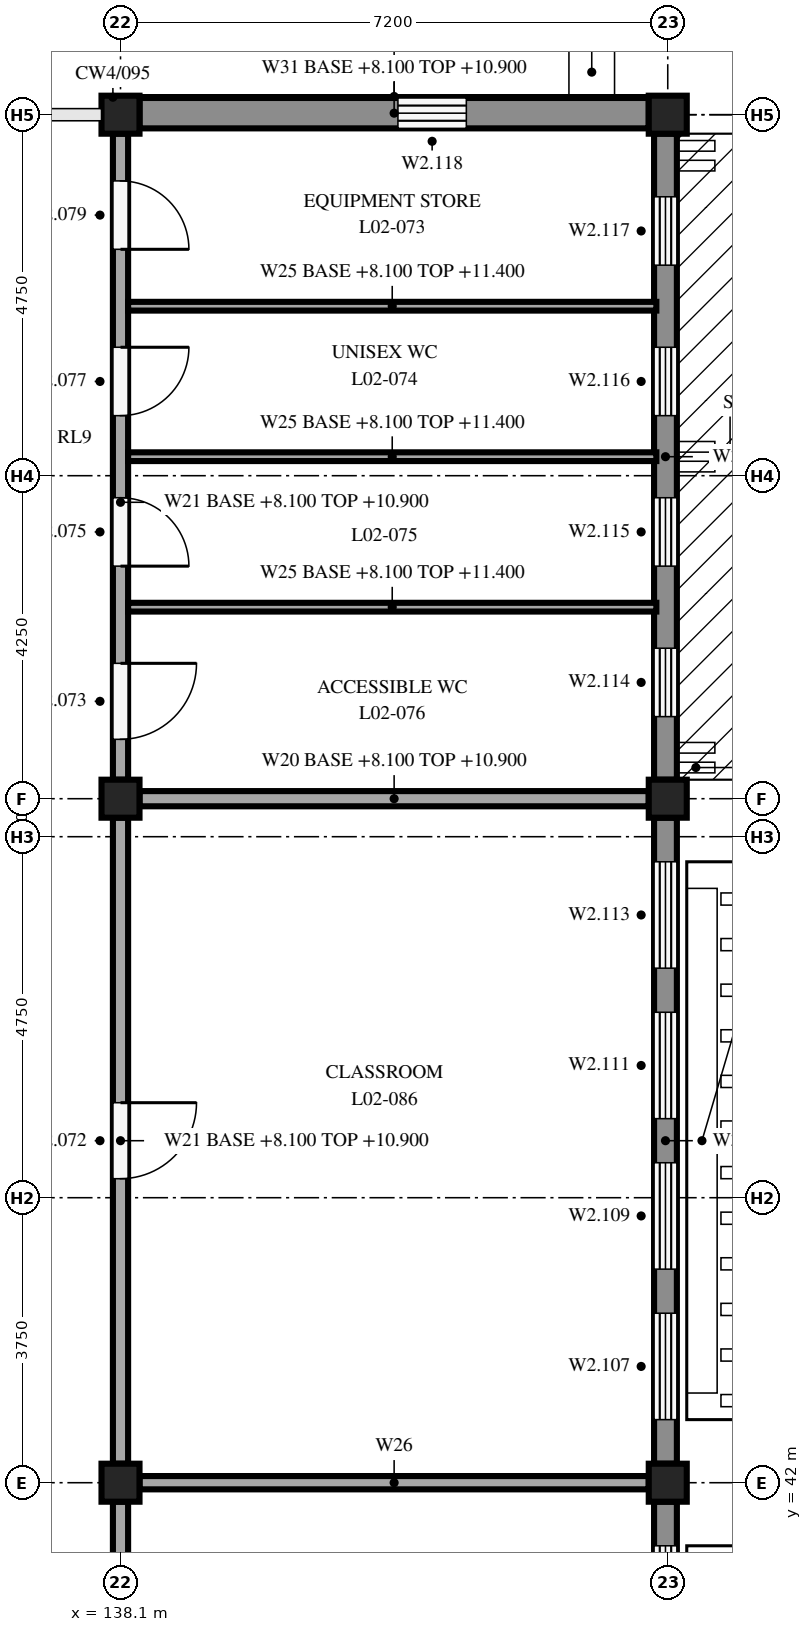
"""IFC4 building model, lengths in metres.
Left out: names, types, materials, properties, quantities, classifications, styles, units other than length and angle.
Written with IfcOpenShell. Run it as: python <this file> out.ifc"""

import sys

from ifc_helpers import new_model, si_unit, direction, frame, frame_2d, origin, origin_2d, place, context, subcontext, project, spatial, rectangle, extrude, element, fill, save


model = new_model("IFC4")
c1 = context("Model", 3, precision=1e-05, world=origin(), true_north=direction((0.0, 1.0)))
c2 = subcontext(c1, "Body", "Model", "MODEL_VIEW")
j1 = project(units=[si_unit("LENGTHUNIT", "METRE"), si_unit("PLANEANGLEUNIT", "RADIAN")], contexts=[c1])
p1 = place(None, origin())
s1 = spatial("IfcSite", under=j1, at=p1, CompositionType="ELEMENT")
p2 = place(p1, origin())
s2 = spatial("IfcBuilding", under=s1, at=p2, CompositionType="ELEMENT")
p3 = place(p2, frame((0.0, 0.0, 8.1)))
s3 = spatial("IfcBuildingStorey", under=s2, at=p3, CompositionType="ELEMENT", Elevation=8.1)
for number, where, z_axis, x_axis in (
    (1, (138.1, 42.0, 0.0), (0.0, 0.0, 1.0), (1.0, 0.0, 0.0)),
    (2, (138.1, 51.0, 0.0), (0.0, 0.0, 1.0), (1.0, 0.0, 0.0)),
    (3, (138.1, 60.0, 0.0), (0.0, 0.0, 1.0), (1.0, 0.0, 0.0)),
    (4, (145.3, 42.0, 0.0), (0.0, 0.0, 1.0), (1.0, 0.0, 0.0)),
    (5, (145.3, 51.0, 0.0), (0.0, 0.0, 1.0), (1.0, 0.0, 0.0)),
    (6, (145.3, 60.0, 0.0), (0.0, 0.0, 1.0), (1.0, 0.0, 0.0)),
):
    element("IfcColumn", number, at=place(p3, frame(where, z_axis=z_axis, x_axis=x_axis)), inside=s3, PredefinedType="COLUMN", context=c2, shape_type="SweptSolid", body=[
        extrude(rectangle(XDim=0.5, YDim=0.5, at=origin_2d()), origin(), (0.0, 0.0, 1.0), 3.3),
    ])
p4 = place(p3, frame((145.27, 41.75, 0.0), z_axis=(0.0, 0.0, 1.0), x_axis=(0.0, -1.0, 0.0)))
e7 = element("IfcWall", 7, at=p4, inside=s3, PredefinedType="STANDARD", context=c2, shape_type="SweptSolid", body=[
    extrude(rectangle(XDim=8.5, YDim=0.3, at=frame_2d((4.25, 0.0))), origin(), (0.0, 0.0, 1.0), 2.75),
])
p5 = place(p4, frame((6.52, 0.0, 0.6)))
e8 = element("IfcOpeningElement", 8, at=p5, cuts=e7, PredefinedType="OPENING", context=c2, shape_type="SweptSolid", body=[
    extrude(rectangle(XDim=1.4, YDim=2.1, at=frame_2d((0.7, 1.05))), frame((0.0, 0.16, 0.0), z_axis=(0.0, -1.0, 0.0), x_axis=(1.0, 0.0, 0.0)), (0.0, 0.0, 1.0), 0.32),
])
p6 = place(p4, frame((4.54, 0.0, 0.6)))
e9 = element("IfcOpeningElement", 9, at=p6, cuts=e7, PredefinedType="OPENING", context=c2, shape_type="SweptSolid", body=[
    extrude(rectangle(XDim=1.4, YDim=2.1, at=frame_2d((0.7, 1.05))), frame((0.0, 0.16, 0.0), z_axis=(0.0, -1.0, 0.0), x_axis=(1.0, 0.0, 0.0)), (0.0, 0.0, 1.0), 0.32),
])
p7 = place(p4, frame((2.56, 0.0, 0.6)))
e10 = element("IfcOpeningElement", 10, at=p7, cuts=e7, PredefinedType="OPENING", context=c2, shape_type="SweptSolid", body=[
    extrude(rectangle(XDim=1.4, YDim=2.1, at=frame_2d((0.7, 1.05))), frame((0.0, 0.16, 0.0), z_axis=(0.0, -1.0, 0.0), x_axis=(1.0, 0.0, 0.0)), (0.0, 0.0, 1.0), 0.32),
])
p8 = place(p4, frame((0.58, 0.0, 0.6)))
e11 = element("IfcOpeningElement", 11, at=p8, cuts=e7, PredefinedType="OPENING", context=c2, shape_type="SweptSolid", body=[
    extrude(rectangle(XDim=1.4, YDim=2.1, at=frame_2d((0.7, 1.05))), frame((0.0, 0.16, 0.0), z_axis=(0.0, -1.0, 0.0), x_axis=(1.0, 0.0, 0.0)), (0.0, 0.0, 1.0), 0.32),
])
p9 = place(p3, frame((145.27, 50.75, 0.0), z_axis=(0.0, 0.0, 1.0), x_axis=(0.0, -1.0, 0.0)))
e12 = element("IfcWall", 12, at=p9, inside=s3, PredefinedType="STANDARD", context=c2, shape_type="SweptSolid", body=[
    extrude(rectangle(XDim=8.5, YDim=0.3, at=frame_2d((4.25, 0.0))), origin(), (0.0, 0.0, 1.0), 2.75),
])
p10 = place(p9, frame((6.52, 0.0, 0.6)))
e13 = element("IfcOpeningElement", 13, at=p10, cuts=e12, PredefinedType="OPENING", context=c2, shape_type="SweptSolid", body=[
    extrude(rectangle(XDim=1.4, YDim=2.1, at=frame_2d((0.7, 1.05))), frame((0.0, 0.16, 0.0), z_axis=(0.0, -1.0, 0.0), x_axis=(1.0, 0.0, 0.0)), (0.0, 0.0, 1.0), 0.32),
])
p11 = place(p9, frame((4.54, 0.0, 0.6)))
e14 = element("IfcOpeningElement", 14, at=p11, cuts=e12, PredefinedType="OPENING", context=c2, shape_type="SweptSolid", body=[
    extrude(rectangle(XDim=1.4, YDim=2.1, at=frame_2d((0.7, 1.05))), frame((0.0, 0.16, 0.0), z_axis=(0.0, -1.0, 0.0), x_axis=(1.0, 0.0, 0.0)), (0.0, 0.0, 1.0), 0.32),
])
p12 = place(p9, frame((2.56, 0.0, 0.6)))
e15 = element("IfcOpeningElement", 15, at=p12, cuts=e12, PredefinedType="OPENING", context=c2, shape_type="SweptSolid", body=[
    extrude(rectangle(XDim=1.4, YDim=2.1, at=frame_2d((0.7, 1.05))), frame((0.0, 0.16, 0.0), z_axis=(0.0, -1.0, 0.0), x_axis=(1.0, 0.0, 0.0)), (0.0, 0.0, 1.0), 0.32),
])
p13 = place(p9, frame((0.58, 0.0, 0.6)))
e16 = element("IfcOpeningElement", 16, at=p13, cuts=e12, PredefinedType="OPENING", context=c2, shape_type="SweptSolid", body=[
    extrude(rectangle(XDim=1.4, YDim=2.1, at=frame_2d((0.7, 1.05))), frame((0.0, 0.16, 0.0), z_axis=(0.0, -1.0, 0.0), x_axis=(1.0, 0.0, 0.0)), (0.0, 0.0, 1.0), 0.32),
])
p14 = place(p3, frame((145.27, 59.75, 0.0), z_axis=(0.0, 0.0, 1.0), x_axis=(0.0, -1.0, 0.0)))
e17 = element("IfcWall", 17, at=p14, inside=s3, PredefinedType="STANDARD", context=c2, shape_type="SweptSolid", body=[
    extrude(rectangle(XDim=8.5, YDim=0.3, at=frame_2d((4.25, 0.0))), origin(), (0.0, 0.0, 1.0), 2.75),
])
p15 = place(p14, frame((6.77, 0.0, 1.6)))
e18 = element("IfcOpeningElement", 18, at=p15, cuts=e17, PredefinedType="OPENING", context=c2, shape_type="SweptSolid", body=[
    extrude(rectangle(XDim=0.9, YDim=1.0, at=frame_2d((0.45, 0.5))), frame((0.0, 0.16, 0.0), z_axis=(0.0, -1.0, 0.0), x_axis=(1.0, 0.0, 0.0)), (0.0, 0.0, 1.0), 0.32),
])
p16 = place(p14, frame((4.79, 0.0, 1.6)))
e19 = element("IfcOpeningElement", 19, at=p16, cuts=e17, PredefinedType="OPENING", context=c2, shape_type="SweptSolid", body=[
    extrude(rectangle(XDim=0.9, YDim=1.0, at=frame_2d((0.45, 0.5))), frame((0.0, 0.16, 0.0), z_axis=(0.0, -1.0, 0.0), x_axis=(1.0, 0.0, 0.0)), (0.0, 0.0, 1.0), 0.32),
])
p17 = place(p14, frame((2.81, 0.0, 1.6)))
e20 = element("IfcOpeningElement", 20, at=p17, cuts=e17, PredefinedType="OPENING", context=c2, shape_type="SweptSolid", body=[
    extrude(rectangle(XDim=0.9, YDim=1.0, at=frame_2d((0.45, 0.5))), frame((0.0, 0.16, 0.0), z_axis=(0.0, -1.0, 0.0), x_axis=(1.0, 0.0, 0.0)), (0.0, 0.0, 1.0), 0.32),
])
p18 = place(p14, frame((0.83, 0.0, 1.6)))
e21 = element("IfcOpeningElement", 21, at=p18, cuts=e17, PredefinedType="OPENING", context=c2, shape_type="SweptSolid", body=[
    extrude(rectangle(XDim=0.9, YDim=1.0, at=frame_2d((0.45, 0.5))), frame((0.0, 0.16, 0.0), z_axis=(0.0, -1.0, 0.0), x_axis=(1.0, 0.0, 0.0)), (0.0, 0.0, 1.0), 0.32),
])
p19 = place(p3, frame((138.35, 60.02, 0.0), z_axis=(0.0, 0.0, 1.0), x_axis=(1.0, 0.0, 0.0)))
e22 = element("IfcWall", 22, at=p19, inside=s3, PredefinedType="STANDARD", context=c2, shape_type="SweptSolid", body=[
    extrude(rectangle(XDim=6.7, YDim=0.4, at=frame_2d((3.35, 0.0))), origin(), (0.0, 0.0, 1.0), 2.8),
])
p20 = place(p19, frame((3.4, 0.0, 1.6)))
e23 = element("IfcOpeningElement", 23, at=p20, cuts=e22, PredefinedType="OPENING", context=c2, shape_type="SweptSolid", body=[
    extrude(rectangle(XDim=0.9, YDim=1.0, at=frame_2d((0.45, 0.5))), frame((0.0, 0.21, 0.0), z_axis=(0.0, -1.0, 0.0), x_axis=(1.0, 0.0, 0.0)), (0.0, 0.0, 1.0), 0.42),
])
p21 = place(p3, frame((138.1, 59.75, 0.0), z_axis=(0.0, 0.0, 1.0), x_axis=(0.0, -1.0, 0.0)))
e24 = element("IfcWall", 24, at=p21, inside=s3, PredefinedType="PARTITIONING", context=c2, shape_type="SweptSolid", body=[
    extrude(rectangle(XDim=8.5, YDim=0.2, at=frame_2d((4.25, 0.0))), origin(), (0.0, 0.0, 1.0), 2.8),
])
p22 = place(p21, frame((6.969, 0.0, 0.0)))
e25 = element("IfcOpeningElement", 25, at=p22, cuts=e24, PredefinedType="OPENING", context=c2, shape_type="SweptSolid", body=[
    extrude(rectangle(XDim=1.0, YDim=2.1, at=frame_2d((0.5, 1.05))), frame((0.0, 0.11, 0.0), z_axis=(0.0, -1.0, 0.0), x_axis=(1.0, 0.0, 0.0)), (0.0, 0.0, 1.0), 0.22),
])
p23 = place(p21, frame((4.79, 0.0, 0.0)))
e26 = element("IfcOpeningElement", 26, at=p23, cuts=e24, PredefinedType="OPENING", context=c2, shape_type="SweptSolid", body=[
    extrude(rectangle(XDim=0.9, YDim=2.1, at=frame_2d((0.45, 1.05))), frame((0.0, 0.11, 0.0), z_axis=(0.0, -1.0, 0.0), x_axis=(1.0, 0.0, 0.0)), (0.0, 0.0, 1.0), 0.22),
])
p24 = place(p21, frame((2.81, 0.0, 0.0)))
e27 = element("IfcOpeningElement", 27, at=p24, cuts=e24, PredefinedType="OPENING", context=c2, shape_type="SweptSolid", body=[
    extrude(rectangle(XDim=0.9, YDim=2.1, at=frame_2d((0.45, 1.05))), frame((0.0, 0.11, 0.0), z_axis=(0.0, -1.0, 0.0), x_axis=(1.0, 0.0, 0.0)), (0.0, 0.0, 1.0), 0.22),
])
p25 = place(p21, frame((0.621, 0.0, 0.0)))
e28 = element("IfcOpeningElement", 28, at=p25, cuts=e24, PredefinedType="OPENING", context=c2, shape_type="SweptSolid", body=[
    extrude(rectangle(XDim=0.9, YDim=2.1, at=frame_2d((0.45, 1.05))), frame((0.0, 0.11, 0.0), z_axis=(0.0, -1.0, 0.0), x_axis=(1.0, 0.0, 0.0)), (0.0, 0.0, 1.0), 0.22),
])
p26 = place(p3, frame((138.35, 51.0, 0.0), z_axis=(0.0, 0.0, 1.0), x_axis=(1.0, 0.0, 0.0)))
e29 = element("IfcWall", 29, at=p26, inside=s3, PredefinedType="PARTITIONING", context=c2, shape_type="SweptSolid", body=[
    extrude(rectangle(XDim=6.7, YDim=0.2, at=frame_2d((3.35, 0.0))), origin(), (0.0, 0.0, 1.0), 2.8),
])
for number, where, z_axis, x_axis in (
    (30, (138.2, 57.48, 0.0), (0.0, 0.0, 1.0), (1.0, 0.0, 0.0)),
    (31, (138.2, 55.5, 0.0), (0.0, 0.0, 1.0), (1.0, 0.0, 0.0)),
    (32, (138.2, 53.52, 0.0), (0.0, 0.0, 1.0), (1.0, 0.0, 0.0)),
):
    element("IfcWall", number, at=place(p3, frame(where, z_axis=z_axis, x_axis=x_axis)), inside=s3, PredefinedType="PARTITIONING", context=c2, shape_type="SweptSolid", body=[
        extrude(rectangle(XDim=6.95, YDim=0.115, at=frame_2d((3.475, 0.0))), origin(), (0.0, 0.0, 1.0), 3.3),
    ])
p27 = place(p3, frame((138.1, 41.75, 0.0), z_axis=(0.0, 0.0, 1.0), x_axis=(0.0, -1.0, 0.0)))
e33 = element("IfcWall", 33, at=p27, inside=s3, PredefinedType="PARTITIONING", context=c2, shape_type="SweptSolid", body=[
    extrude(rectangle(XDim=8.5, YDim=0.2, at=frame_2d((4.25, 0.0))), origin(), (0.0, 0.0, 1.0), 2.8),
])
p28 = place(p27, frame((5.919, 0.0, 0.0)))
e34 = element("IfcOpeningElement", 34, at=p28, cuts=e33, PredefinedType="OPENING", context=c2, shape_type="SweptSolid", body=[
    extrude(rectangle(XDim=1.0, YDim=2.1, at=frame_2d((0.5, 1.05))), frame((0.0, 0.11, 0.0), z_axis=(0.0, -1.0, 0.0), x_axis=(1.0, 0.0, 0.0)), (0.0, 0.0, 1.0), 0.22),
])
p29 = place(p27, frame((1.581, 0.0, 0.0)))
e35 = element("IfcOpeningElement", 35, at=p29, cuts=e33, PredefinedType="OPENING", context=c2, shape_type="SweptSolid", body=[
    extrude(rectangle(XDim=1.0, YDim=2.1, at=frame_2d((0.5, 1.05))), frame((0.0, 0.11, 0.0), z_axis=(0.0, -1.0, 0.0), x_axis=(1.0, 0.0, 0.0)), (0.0, 0.0, 1.0), 0.22),
])
p30 = place(p3, frame((138.1, 50.75, 0.0), z_axis=(0.0, 0.0, 1.0), x_axis=(0.0, -1.0, 0.0)))
e36 = element("IfcWall", 36, at=p30, inside=s3, PredefinedType="PARTITIONING", context=c2, shape_type="SweptSolid", body=[
    extrude(rectangle(XDim=8.5, YDim=0.2, at=frame_2d((4.25, 0.0))), origin(), (0.0, 0.0, 1.0), 2.8),
])
p31 = place(p30, frame((3.75, 0.0, 0.0)))
e37 = element("IfcOpeningElement", 37, at=p31, cuts=e36, PredefinedType="OPENING", context=c2, shape_type="SweptSolid", body=[
    extrude(rectangle(XDim=1.0, YDim=2.1, at=frame_2d((0.5, 1.05))), frame((0.0, 0.11, 0.0), z_axis=(0.0, -1.0, 0.0), x_axis=(1.0, 0.0, 0.0)), (0.0, 0.0, 1.0), 0.22),
])
p32 = place(p3, frame((138.35, 42.0, 0.0), z_axis=(0.0, 0.0, 1.0), x_axis=(1.0, 0.0, 0.0)))
e38 = element("IfcWall", 38, at=p32, inside=s3, PredefinedType="PARTITIONING", context=c2, shape_type="SweptSolid", body=[
    extrude(rectangle(XDim=6.7, YDim=0.175, at=frame_2d((3.35, 0.0))), origin(), (0.0, 0.0, 1.0), 2.8),
])
p33 = place(p8, origin())
e39 = element("IfcWindow", 39, at=p33, inside=s3, PartitioningType="DOUBLE_PANEL_VERTICAL", PredefinedType="WINDOW", context=c2, shape_type="SweptSolid", body=[
    extrude(rectangle(XDim=1.4, YDim=2.1, at=frame_2d((0.7, 1.05))), frame((0.0, 0.03, 0.0), z_axis=(0.0, -1.0, 0.0), x_axis=(1.0, 0.0, 0.0)), (0.0, 0.0, 1.0), 0.06),
])
fill(e11, e39)
p34 = place(p10, origin())
e40 = element("IfcWindow", 40, at=p34, inside=s3, PartitioningType="DOUBLE_PANEL_VERTICAL", PredefinedType="WINDOW", context=c2, shape_type="SweptSolid", body=[
    extrude(rectangle(XDim=1.4, YDim=2.1, at=frame_2d((0.7, 1.05))), frame((0.0, 0.03, 0.0), z_axis=(0.0, -1.0, 0.0), x_axis=(1.0, 0.0, 0.0)), (0.0, 0.0, 1.0), 0.06),
])
fill(e13, e40)
p35 = place(p11, origin())
e41 = element("IfcWindow", 41, at=p35, inside=s3, PartitioningType="DOUBLE_PANEL_VERTICAL", PredefinedType="WINDOW", context=c2, shape_type="SweptSolid", body=[
    extrude(rectangle(XDim=1.4, YDim=2.1, at=frame_2d((0.7, 1.05))), frame((0.0, 0.03, 0.0), z_axis=(0.0, -1.0, 0.0), x_axis=(1.0, 0.0, 0.0)), (0.0, 0.0, 1.0), 0.06),
])
fill(e14, e41)
p36 = place(p12, origin())
e42 = element("IfcWindow", 42, at=p36, inside=s3, PartitioningType="DOUBLE_PANEL_VERTICAL", PredefinedType="WINDOW", context=c2, shape_type="SweptSolid", body=[
    extrude(rectangle(XDim=1.4, YDim=2.1, at=frame_2d((0.7, 1.05))), frame((0.0, 0.03, 0.0), z_axis=(0.0, -1.0, 0.0), x_axis=(1.0, 0.0, 0.0)), (0.0, 0.0, 1.0), 0.06),
])
fill(e15, e42)
p37 = place(p13, origin())
e43 = element("IfcWindow", 43, at=p37, inside=s3, PartitioningType="DOUBLE_PANEL_VERTICAL", PredefinedType="WINDOW", context=c2, shape_type="SweptSolid", body=[
    extrude(rectangle(XDim=1.4, YDim=2.1, at=frame_2d((0.7, 1.05))), frame((0.0, 0.03, 0.0), z_axis=(0.0, -1.0, 0.0), x_axis=(1.0, 0.0, 0.0)), (0.0, 0.0, 1.0), 0.06),
])
fill(e16, e43)
p38 = place(p15, origin())
e44 = element("IfcWindow", 44, at=p38, inside=s3, PartitioningType="SINGLE_PANEL", PredefinedType="WINDOW", context=c2, shape_type="SweptSolid", body=[
    extrude(rectangle(XDim=0.9, YDim=1.0, at=frame_2d((0.45, 0.5))), frame((0.0, 0.03, 0.0), z_axis=(0.0, -1.0, 0.0), x_axis=(1.0, 0.0, 0.0)), (0.0, 0.0, 1.0), 0.06),
])
fill(e18, e44)
p39 = place(p16, origin())
e45 = element("IfcWindow", 45, at=p39, inside=s3, PartitioningType="SINGLE_PANEL", PredefinedType="WINDOW", context=c2, shape_type="SweptSolid", body=[
    extrude(rectangle(XDim=0.9, YDim=1.0, at=frame_2d((0.45, 0.5))), frame((0.0, 0.03, 0.0), z_axis=(0.0, -1.0, 0.0), x_axis=(1.0, 0.0, 0.0)), (0.0, 0.0, 1.0), 0.06),
])
fill(e19, e45)
p40 = place(p17, origin())
e46 = element("IfcWindow", 46, at=p40, inside=s3, PartitioningType="SINGLE_PANEL", PredefinedType="WINDOW", context=c2, shape_type="SweptSolid", body=[
    extrude(rectangle(XDim=0.9, YDim=1.0, at=frame_2d((0.45, 0.5))), frame((0.0, 0.03, 0.0), z_axis=(0.0, -1.0, 0.0), x_axis=(1.0, 0.0, 0.0)), (0.0, 0.0, 1.0), 0.06),
])
fill(e20, e46)
p41 = place(p18, origin())
e47 = element("IfcWindow", 47, at=p41, inside=s3, PartitioningType="SINGLE_PANEL", PredefinedType="WINDOW", context=c2, shape_type="SweptSolid", body=[
    extrude(rectangle(XDim=0.9, YDim=1.0, at=frame_2d((0.45, 0.5))), frame((0.0, 0.03, 0.0), z_axis=(0.0, -1.0, 0.0), x_axis=(1.0, 0.0, 0.0)), (0.0, 0.0, 1.0), 0.06),
])
fill(e21, e47)
p42 = place(p20, origin())
e48 = element("IfcWindow", 48, at=p42, inside=s3, PartitioningType="SINGLE_PANEL", PredefinedType="WINDOW", context=c2, shape_type="SweptSolid", body=[
    extrude(rectangle(XDim=0.9, YDim=1.0, at=frame_2d((0.45, 0.5))), frame((0.0, 0.03, 0.0), z_axis=(0.0, -1.0, 0.0), x_axis=(1.0, 0.0, 0.0)), (0.0, 0.0, 1.0), 0.06),
])
fill(e23, e48)
p43 = place(p22, origin())
e49 = element("IfcDoor", 49, at=p43, inside=s3, OperationType="SINGLE_SWING_LEFT", PredefinedType="DOOR", context=c2, shape_type="SweptSolid", body=[
    extrude(rectangle(XDim=1.0, YDim=2.1, at=frame_2d((0.5, 1.05))), frame((0.0, 0.025, 0.0), z_axis=(0.0, -1.0, 0.0), x_axis=(1.0, 0.0, 0.0)), (0.0, 0.0, 1.0), 0.05),
])
fill(e25, e49)
p44 = place(p23, origin())
e50 = element("IfcDoor", 50, at=p44, inside=s3, OperationType="SINGLE_SWING_RIGHT", PredefinedType="DOOR", context=c2, shape_type="SweptSolid", body=[
    extrude(rectangle(XDim=0.9, YDim=2.1, at=frame_2d((0.45, 1.05))), frame((0.0, 0.025, 0.0), z_axis=(0.0, -1.0, 0.0), x_axis=(1.0, 0.0, 0.0)), (0.0, 0.0, 1.0), 0.05),
])
fill(e26, e50)
p45 = place(p24, origin())
e51 = element("IfcDoor", 51, at=p45, inside=s3, OperationType="SINGLE_SWING_LEFT", PredefinedType="DOOR", context=c2, shape_type="SweptSolid", body=[
    extrude(rectangle(XDim=0.9, YDim=2.1, at=frame_2d((0.45, 1.05))), frame((0.0, 0.025, 0.0), z_axis=(0.0, -1.0, 0.0), x_axis=(1.0, 0.0, 0.0)), (0.0, 0.0, 1.0), 0.05),
])
fill(e27, e51)
p46 = place(p25, origin())
e52 = element("IfcDoor", 52, at=p46, inside=s3, OperationType="SINGLE_SWING_RIGHT", PredefinedType="DOOR", context=c2, shape_type="SweptSolid", body=[
    extrude(rectangle(XDim=0.9, YDim=2.1, at=frame_2d((0.45, 1.05))), frame((0.0, 0.025, 0.0), z_axis=(0.0, -1.0, 0.0), x_axis=(1.0, 0.0, 0.0)), (0.0, 0.0, 1.0), 0.05),
])
fill(e28, e52)
p47 = place(p31, origin())
e53 = element("IfcDoor", 53, at=p47, inside=s3, OperationType="SINGLE_SWING_LEFT", PredefinedType="DOOR", context=c2, shape_type="SweptSolid", body=[
    extrude(rectangle(XDim=1.0, YDim=2.1, at=frame_2d((0.5, 1.05))), frame((0.0, 0.025, 0.0), z_axis=(0.0, -1.0, 0.0), x_axis=(1.0, 0.0, 0.0)), (0.0, 0.0, 1.0), 0.05),
])
fill(e37, e53)
save(model, sys.argv[1])
